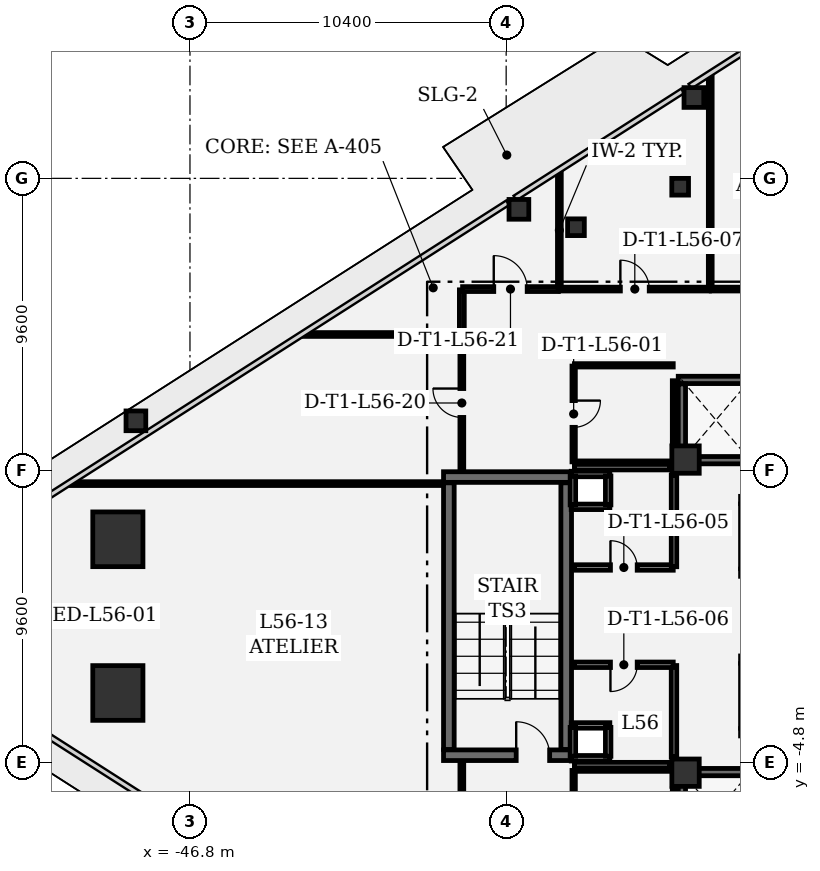
"""IFC4 building model, lengths in metres.
Left out: names, types, materials, properties, quantities, classifications, styles, units other than length and angle.
Written with IfcOpenShell. Run it as: python <this file> out.ifc"""

import sys

from ifc_helpers import new_model, si_unit, direction, frame, frame_2d, origin, origin_2d, place, context, subcontext, project, spatial, rectangle, extrude, element, fill, save


model = new_model("IFC4")
c1 = context("Model", 3, precision=1e-05, world=origin(), true_north=direction((0.0, 1.0)))
c2 = subcontext(c1, "Body", "Model", "MODEL_VIEW")
j1 = project(units=[si_unit("LENGTHUNIT", "METRE"), si_unit("PLANEANGLEUNIT", "RADIAN")], contexts=[c1])
p1 = place(None, origin())
s1 = spatial("IfcSite", under=j1, at=p1, CompositionType="ELEMENT")
p2 = place(p1, origin())
s2 = spatial("IfcBuilding", under=s1, at=p2, CompositionType="ELEMENT")
p3 = place(p2, frame((0.0, 0.0, 241.5)))
s3 = spatial("IfcBuildingStorey", under=s2, at=p3, CompositionType="ELEMENT", Elevation=241.5)
for number, where, z_axis, x_axis in (
    (1, (-49.172, 2.528, 0.0), (0.0, 0.0, 1.0), (1.0, 0.0, 0.0)),
    (2, (-49.172, -2.528, 0.0), (0.0, 0.0, 1.0), (1.0, 0.0, 0.0)),
):
    element("IfcColumn", number, at=place(p3, frame(where, z_axis=z_axis, x_axis=x_axis)), inside=s3, PredefinedType="COLUMN", context=c2, shape_type="SweptSolid", body=[
        extrude(rectangle(XDim=1.65, YDim=1.8, at=origin_2d()), origin(), (0.0, 0.0, 1.0), 4.05),
    ])
for number, where, z_axis, x_axis in (
    (3, (-30.5, 5.15, 0.0), (0.0, 0.0, 1.0), (1.0, 0.0, 0.0)),
    (4, (-30.5, -5.15, 0.0), (0.0, 0.0, 1.0), (1.0, 0.0, 0.0)),
):
    element("IfcColumn", number, at=place(p3, frame(where, z_axis=z_axis, x_axis=x_axis)), inside=s3, PredefinedType="COLUMN", context=c2, shape_type="SweptSolid", body=[
        extrude(rectangle(XDim=0.9, YDim=0.9, at=origin_2d()), origin(), (0.0, 0.0, 1.0), 4.05),
    ])
for number, where, z_axis, x_axis in (
    (5, (-48.578, 6.425, 0.0), (0.0, 0.0, 1.0), (1.0, 0.0, 0.0)),
    (6, (-35.981, 13.381, 0.0), (0.0, 0.0, 1.0), (1.0, 0.0, 0.0)),
    (7, (-30.225, 17.06, 0.0), (0.0, 0.0, 1.0), (1.0, 0.0, 0.0)),
):
    element("IfcColumn", number, at=place(p3, frame(where, z_axis=z_axis, x_axis=x_axis)), inside=s3, PredefinedType="COLUMN", context=c2, shape_type="SweptSolid", body=[
        extrude(rectangle(XDim=0.65, YDim=0.65, at=origin_2d()), origin(), (0.0, 0.0, 1.0), 4.05),
    ])
for number, where, z_axis, x_axis in (
    (8, (-34.104, 12.792, 0.0), (0.0, 0.0, 1.0), (1.0, 0.0, 0.0)),
    (9, (-30.677, 14.124, 0.0), (0.0, 0.0, 1.0), (1.0, 0.0, 0.0)),
):
    element("IfcColumn", number, at=place(p3, frame(where, z_axis=z_axis, x_axis=x_axis)), inside=s3, PredefinedType="COLUMN", context=c2, shape_type="SweptSolid", body=[
        extrude(rectangle(XDim=0.55, YDim=0.55, at=origin_2d()), origin(), (0.0, 0.0, 1.0), 4.05),
    ])
p4 = place(p3, frame((-38.46, -4.575, 0.0), z_axis=(0.0, 0.0, 1.0), x_axis=(1.0, 0.0, 0.0)))
e10 = element("IfcWall", 10, at=p4, inside=s3, PredefinedType="SHEAR", context=c2, shape_type="SweptSolid", body=[
    extrude(rectangle(XDim=4.21, YDim=0.35, at=frame_2d((2.105, 0.0))), origin(), (0.0, 0.0, 1.0), 3.78),
])
p5 = place(p4, frame((2.39, 0.0, 0.0)))
e11 = element("IfcOpeningElement", 11, at=p5, cuts=e10, PredefinedType="OPENING", context=c2, shape_type="SweptSolid", body=[
    extrude(rectangle(XDim=1.1, YDim=2.2, at=frame_2d((0.55, 1.1))), frame((0.0, 0.185, 0.0), z_axis=(0.0, -1.0, 0.0), x_axis=(1.0, 0.0, 0.0)), (0.0, 0.0, 1.0), 0.37),
])
p6 = place(p3, frame((-34.25, 4.575, 0.0), z_axis=(0.0, 0.0, 1.0), x_axis=(-1.0, 0.0, 0.0)))
e12 = element("IfcWall", 12, at=p6, inside=s3, PredefinedType="SHEAR", context=c2, shape_type="SweptSolid", body=[
    extrude(rectangle(XDim=4.21, YDim=0.35, at=frame_2d((2.105, 0.0))), origin(), (0.0, 0.0, 1.0), 3.78),
])
for number, where, z_axis, x_axis in (
    (13, (-34.425, -4.385, 0.0), (0.0, 0.0, 1.0), (0.0, 1.0, 0.0)),
    (14, (-38.285, 4.385, 0.0), (0.0, 0.0, 1.0), (0.0, -1.0, 0.0)),
):
    element("IfcWall", number, at=place(p3, frame(where, z_axis=z_axis, x_axis=x_axis)), inside=s3, PredefinedType="SHEAR", context=c2, shape_type="SweptSolid", body=[
        extrude(rectangle(XDim=8.77, YDim=0.35, at=frame_2d((4.385, 0.0))), origin(), (0.0, 0.0, 1.0), 3.78),
    ])
for number, where, z_axis, x_axis in (
    (15, (-28.26, 5.13, 0.0), (0.0, 0.0, 1.0), (-1.0, 0.0, 0.0)),
    (16, (-30.74, 7.77, 0.0), (0.0, 0.0, 1.0), (1.0, 0.0, 0.0)),
):
    element("IfcWall", number, at=place(p3, frame(where, z_axis=z_axis, x_axis=x_axis)), inside=s3, PredefinedType="SHEAR", context=c2, shape_type="SweptSolid", body=[
        extrude(rectangle(XDim=2.48, YDim=0.24, at=frame_2d((1.24, 0.0))), origin(), (0.0, 0.0, 1.0), 3.78),
    ])
p7 = place(p3, frame((-30.62, 5.262, 0.0), z_axis=(0.0, 0.0, 1.0), x_axis=(0.0, 1.0, 0.0)))
e17 = element("IfcWall", 17, at=p7, inside=s3, PredefinedType="SHEAR", context=c2, shape_type="SweptSolid", body=[
    extrude(rectangle(XDim=2.376, YDim=0.24, at=frame_2d((1.188, 0.0))), origin(), (0.0, 0.0, 1.0), 3.78),
])
p8 = place(p3, frame((-30.74, -5.13, 0.0), z_axis=(0.0, 0.0, 1.0), x_axis=(1.0, 0.0, 0.0)))
e18 = element("IfcWall", 18, at=p8, inside=s3, PredefinedType="SHEAR", context=c2, shape_type="SweptSolid", body=[
    extrude(rectangle(XDim=2.48, YDim=0.24, at=frame_2d((1.24, 0.0))), origin(), (0.0, 0.0, 1.0), 3.78),
])
p9 = place(p3, frame((-30.62, -7.638, 0.0), z_axis=(0.0, 0.0, 1.0), x_axis=(0.0, 1.0, 0.0)))
e19 = element("IfcWall", 19, at=p9, inside=s3, PredefinedType="SHEAR", context=c2, shape_type="SweptSolid", body=[
    extrude(rectangle(XDim=2.376, YDim=0.24, at=frame_2d((1.188, 0.0))), origin(), (0.0, 0.0, 1.0), 3.78),
])
for number, where, z_axis, x_axis in (
    (20, (-26.61, 1.43, 0.0), (0.0, 0.0, 1.0), (-1.0, 0.0, 0.0)),
    (21, (-28.69, 3.82, 0.0), (0.0, 0.0, 1.0), (1.0, 0.0, 0.0)),
):
    element("IfcWall", number, at=place(p3, frame(where, z_axis=z_axis, x_axis=x_axis)), inside=s3, PredefinedType="SHEAR", context=c2, shape_type="SweptSolid", body=[
        extrude(rectangle(XDim=2.08, YDim=0.24, at=frame_2d((1.04, 0.0))), origin(), (0.0, 0.0, 1.0), 3.78),
    ])
p10 = place(p3, frame((-28.57, 1.562, 0.0), z_axis=(0.0, 0.0, 1.0), x_axis=(0.0, 1.0, 0.0)))
e22 = element("IfcWall", 22, at=p10, inside=s3, PredefinedType="SHEAR", context=c2, shape_type="SweptSolid", body=[
    extrude(rectangle(XDim=2.126, YDim=0.24, at=frame_2d((1.063, 0.0))), origin(), (0.0, 0.0, 1.0), 3.78),
])
for number, where, z_axis, x_axis in (
    (23, (-26.61, -3.82, 0.0), (0.0, 0.0, 1.0), (-1.0, 0.0, 0.0)),
    (24, (-28.69, -1.43, 0.0), (0.0, 0.0, 1.0), (1.0, 0.0, 0.0)),
):
    element("IfcWall", number, at=place(p3, frame(where, z_axis=z_axis, x_axis=x_axis)), inside=s3, PredefinedType="SHEAR", context=c2, shape_type="SweptSolid", body=[
        extrude(rectangle(XDim=2.08, YDim=0.24, at=frame_2d((1.04, 0.0))), origin(), (0.0, 0.0, 1.0), 3.78),
    ])
p11 = place(p3, frame((-28.57, -3.688, 0.0), z_axis=(0.0, 0.0, 1.0), x_axis=(0.0, 1.0, 0.0)))
e25 = element("IfcWall", 25, at=p11, inside=s3, PredefinedType="SHEAR", context=c2, shape_type="SweptSolid", body=[
    extrude(rectangle(XDim=2.126, YDim=0.24, at=frame_2d((1.063, 0.0))), origin(), (0.0, 0.0, 1.0), 3.78),
])
for number, where, z_axis, x_axis in (
    (26, (-32.99, 3.595, 0.0), (0.0, 0.0, 1.0), (-1.0, 0.0, 0.0)),
    (27, (-34.26, 4.675, 0.0), (0.0, 0.0, 1.0), (1.0, 0.0, 0.0)),
):
    element("IfcWall", number, at=place(p3, frame(where, z_axis=z_axis, x_axis=x_axis)), inside=s3, PredefinedType="PARTITIONING", context=c2, shape_type="SweptSolid", body=[
        extrude(rectangle(XDim=1.27, YDim=0.18, at=frame_2d((0.635, 0.0))), origin(), (0.0, 0.0, 1.0), 3.78),
    ])
for number, where, z_axis, x_axis in (
    (28, (-34.205, 3.66, 0.0), (0.0, 0.0, 1.0), (0.0, 1.0, 0.0)),
    (29, (-33.045, 4.61, 0.0), (0.0, 0.0, 1.0), (0.0, -1.0, 0.0)),
):
    element("IfcWall", number, at=place(p3, frame(where, z_axis=z_axis, x_axis=x_axis)), inside=s3, PredefinedType="PARTITIONING", context=c2, shape_type="SweptSolid", body=[
        extrude(rectangle(XDim=0.95, YDim=0.18, at=frame_2d((0.475, 0.0))), origin(), (0.0, 0.0, 1.0), 3.78),
    ])
for number, where, z_axis, x_axis in (
    (30, (-32.99, -4.675, 0.0), (0.0, 0.0, 1.0), (-1.0, 0.0, 0.0)),
    (31, (-34.26, -3.595, 0.0), (0.0, 0.0, 1.0), (1.0, 0.0, 0.0)),
):
    element("IfcWall", number, at=place(p3, frame(where, z_axis=z_axis, x_axis=x_axis)), inside=s3, PredefinedType="PARTITIONING", context=c2, shape_type="SweptSolid", body=[
        extrude(rectangle(XDim=1.27, YDim=0.18, at=frame_2d((0.635, 0.0))), origin(), (0.0, 0.0, 1.0), 3.78),
    ])
for number, where, z_axis, x_axis in (
    (32, (-34.205, -4.61, 0.0), (0.0, 0.0, 1.0), (0.0, 1.0, 0.0)),
    (33, (-33.045, -3.66, 0.0), (0.0, 0.0, 1.0), (0.0, -1.0, 0.0)),
):
    element("IfcWall", number, at=place(p3, frame(where, z_axis=z_axis, x_axis=x_axis)), inside=s3, PredefinedType="PARTITIONING", context=c2, shape_type="SweptSolid", body=[
        extrude(rectangle(XDim=0.95, YDim=0.18, at=frame_2d((0.475, 0.0))), origin(), (0.0, 0.0, 1.0), 3.78),
    ])
p12 = place(p3, frame((-34.18, 8.225, 0.0), z_axis=(0.0, 0.0, 1.0), x_axis=(0.0, -1.0, 0.0)))
e34 = element("IfcWall", 34, at=p12, inside=s3, PredefinedType="PARTITIONING", context=c2, shape_type="SweptSolid", body=[
    extrude(rectangle(XDim=3.15, YDim=0.11, at=frame_2d((1.575, 0.0))), origin(), (0.0, 0.0, 1.0), 3.78),
])
p13 = place(p12, frame((1.135, 0.0, 0.0)))
e35 = element("IfcOpeningElement", 35, at=p13, cuts=e34, PredefinedType="OPENING", context=c2, shape_type="SweptSolid", body=[
    extrude(rectangle(XDim=0.88, YDim=2.1, at=frame_2d((0.44, 1.05))), frame((0.0, 0.065, 0.0), z_axis=(0.0, -1.0, 0.0), x_axis=(1.0, 0.0, 0.0)), (0.0, 0.0, 1.0), 0.13),
])
p14 = place(p3, frame((-34.155, 5.05, 0.0), z_axis=(0.0, 0.0, 1.0), x_axis=(1.0, 0.0, 0.0)))
e36 = element("IfcWall", 36, at=p14, inside=s3, PredefinedType="PARTITIONING", context=c2, shape_type="SweptSolid", body=[
    extrude(rectangle(XDim=3.14, YDim=0.11, at=frame_2d((1.57, 0.0))), origin(), (0.0, 0.0, 1.0), 3.78),
])
p15 = place(p3, frame((-30.88, 5.665, 0.0), z_axis=(0.0, 0.0, 1.0), x_axis=(0.0, 1.0, 0.0)))
e37 = element("IfcWall", 37, at=p15, inside=s3, PredefinedType="PARTITIONING", context=c2, shape_type="SweptSolid", body=[
    extrude(rectangle(XDim=2.078, YDim=0.11, at=frame_2d((1.039, 0.0))), origin(), (0.0, 0.0, 1.0), 3.78),
])
p16 = place(p3, frame((-30.905, 8.25, 0.0), z_axis=(0.0, 0.0, 1.0), x_axis=(-1.0, 0.0, 0.0)))
e38 = element("IfcWall", 38, at=p16, inside=s3, PredefinedType="PARTITIONING", context=c2, shape_type="SweptSolid", body=[
    extrude(rectangle(XDim=3.25, YDim=0.11, at=frame_2d((1.625, 0.0))), origin(), (0.0, 0.0, 1.0), 3.78),
])
p17 = place(p3, frame((-30.88, -7.743, 0.0), z_axis=(0.0, 0.0, 1.0), x_axis=(0.0, 1.0, 0.0)))
e39 = element("IfcWall", 39, at=p17, inside=s3, PredefinedType="PARTITIONING", context=c2, shape_type="SweptSolid", body=[
    extrude(rectangle(XDim=2.078, YDim=0.11, at=frame_2d((1.039, 0.0))), origin(), (0.0, 0.0, 1.0), 3.78),
])
p18 = place(p3, frame((-31.015, -5.05, 0.0), z_axis=(0.0, 0.0, 1.0), x_axis=(-1.0, 0.0, 0.0)))
e40 = element("IfcWall", 40, at=p18, inside=s3, PredefinedType="PARTITIONING", context=c2, shape_type="SweptSolid", body=[
    extrude(rectangle(XDim=3.14, YDim=0.11, at=frame_2d((1.57, 0.0))), origin(), (0.0, 0.0, 1.0), 3.78),
])
p19 = place(p3, frame((-34.18, -5.075, 0.0), z_axis=(0.0, 0.0, 1.0), x_axis=(0.0, -1.0, 0.0)))
e41 = element("IfcWall", 41, at=p19, inside=s3, PredefinedType="PARTITIONING", context=c2, shape_type="SweptSolid", body=[
    extrude(rectangle(XDim=3.25, YDim=0.11, at=frame_2d((1.625, 0.0))), origin(), (0.0, 0.0, 1.0), 3.78),
])
p20 = place(p19, frame((1.185, 0.0, 0.0)))
e42 = element("IfcOpeningElement", 42, at=p20, cuts=e41, PredefinedType="OPENING", context=c2, shape_type="SweptSolid", body=[
    extrude(rectangle(XDim=0.88, YDim=2.1, at=frame_2d((0.44, 1.05))), frame((0.0, 0.065, 0.0), z_axis=(0.0, -1.0, 0.0), x_axis=(1.0, 0.0, 0.0)), (0.0, 0.0, 1.0), 0.13),
])
p21 = place(p3, frame((-34.155, 1.6, 0.0), z_axis=(0.0, 0.0, 1.0), x_axis=(1.0, 0.0, 0.0)))
e43 = element("IfcWall", 43, at=p21, inside=s3, PredefinedType="PARTITIONING", context=c2, shape_type="SweptSolid", body=[
    extrude(rectangle(XDim=3.25, YDim=0.18, at=frame_2d((1.625, 0.0))), origin(), (0.0, 0.0, 1.0), 3.78),
])
p22 = place(p21, frame((1.185, 0.0, 0.0)))
e44 = element("IfcOpeningElement", 44, at=p22, cuts=e43, PredefinedType="OPENING", context=c2, shape_type="SweptSolid", body=[
    extrude(rectangle(XDim=0.88, YDim=2.1, at=frame_2d((0.44, 1.05))), frame((0.0, 0.1, 0.0), z_axis=(0.0, -1.0, 0.0), x_axis=(1.0, 0.0, 0.0)), (0.0, 0.0, 1.0), 0.2),
])
p23 = place(p3, frame((-30.88, 1.625, 0.0), z_axis=(0.0, 0.0, 1.0), x_axis=(0.0, 1.0, 0.0)))
e45 = element("IfcWall", 45, at=p23, inside=s3, PredefinedType="PARTITIONING", context=c2, shape_type="SweptSolid", body=[
    extrude(rectangle(XDim=3.01, YDim=0.18, at=frame_2d((1.505, 0.0))), origin(), (0.0, 0.0, 1.0), 3.78),
])
for number, where, z_axis, x_axis in (
    (46, (-31.015, 4.9, 0.0), (0.0, 0.0, 1.0), (-1.0, 0.0, 0.0)),
    (47, (-34.155, -4.9, 0.0), (0.0, 0.0, 1.0), (1.0, 0.0, 0.0)),
):
    element("IfcWall", number, at=place(p3, frame(where, z_axis=z_axis, x_axis=x_axis)), inside=s3, PredefinedType="PARTITIONING", context=c2, shape_type="SweptSolid", body=[
        extrude(rectangle(XDim=3.14, YDim=0.18, at=frame_2d((1.57, 0.0))), origin(), (0.0, 0.0, 1.0), 3.78),
    ])
p24 = place(p3, frame((-30.88, -4.635, 0.0), z_axis=(0.0, 0.0, 1.0), x_axis=(0.0, 1.0, 0.0)))
e48 = element("IfcWall", 48, at=p24, inside=s3, PredefinedType="PARTITIONING", context=c2, shape_type="SweptSolid", body=[
    extrude(rectangle(XDim=3.01, YDim=0.18, at=frame_2d((1.505, 0.0))), origin(), (0.0, 0.0, 1.0), 3.78),
])
p25 = place(p3, frame((-30.905, -1.6, 0.0), z_axis=(0.0, 0.0, 1.0), x_axis=(-1.0, 0.0, 0.0)))
e49 = element("IfcWall", 49, at=p25, inside=s3, PredefinedType="PARTITIONING", context=c2, shape_type="SweptSolid", body=[
    extrude(rectangle(XDim=3.25, YDim=0.18, at=frame_2d((1.625, 0.0))), origin(), (0.0, 0.0, 1.0), 3.78),
])
p26 = place(p25, frame((1.185, 0.0, 0.0)))
e50 = element("IfcOpeningElement", 50, at=p26, cuts=e49, PredefinedType="OPENING", context=c2, shape_type="SweptSolid", body=[
    extrude(rectangle(XDim=0.88, YDim=2.1, at=frame_2d((0.44, 1.05))), frame((0.0, 0.1, 0.0), z_axis=(0.0, -1.0, 0.0), x_axis=(1.0, 0.0, 0.0)), (0.0, 0.0, 1.0), 0.2),
])
p27 = place(p3, frame((-34.65, 14.604, 0.0), z_axis=(0.0, 0.0, 1.0), x_axis=(0.0, -1.0, 0.0)))
e51 = element("IfcWall", 51, at=p27, inside=s3, PredefinedType="PARTITIONING", context=c2, shape_type="SweptSolid", body=[
    extrude(rectangle(XDim=3.82, YDim=0.125, at=frame_2d((1.91, 0.0))), origin(), (0.0, 0.0, 1.0), 3.78),
])
p28 = place(p3, frame((-34.625, 10.758, 0.0), z_axis=(0.0, 0.0, 1.0), x_axis=(1.0, 0.0, 0.0)))
e52 = element("IfcWall", 52, at=p28, inside=s3, PredefinedType="PARTITIONING", context=c2, shape_type="SweptSolid", body=[
    extrude(rectangle(XDim=4.913, YDim=0.125, at=frame_2d((2.456, 0.0))), origin(), (0.0, 0.0, 1.0), 3.0),
])
p29 = place(p28, frame((1.981, 0.0, 0.0)))
e53 = element("IfcOpeningElement", 53, at=p29, cuts=e52, PredefinedType="OPENING", context=c2, shape_type="SweptSolid", body=[
    extrude(rectangle(XDim=0.95, YDim=2.15, at=frame_2d((0.475, 1.075))), frame((0.0, 0.073, 0.0), z_axis=(0.0, -1.0, 0.0), x_axis=(1.0, 0.0, 0.0)), (0.0, 0.0, 1.0), 0.145),
])
p30 = place(p3, frame((-29.687, 10.783, 0.0), z_axis=(0.0, 0.0, 1.0), x_axis=(0.0, 1.0, 0.0)))
e54 = element("IfcWall", 54, at=p30, inside=s3, PredefinedType="PARTITIONING", context=c2, shape_type="SweptSolid", body=[
    extrude(rectangle(XDim=6.992, YDim=0.125, at=frame_2d((3.496, 0.0))), origin(), (0.0, 0.0, 1.0), 3.78),
])
p31 = place(p3, frame((-29.654, 10.758, 0.0), z_axis=(0.0, 0.0, 1.0), x_axis=(1.0, 0.0, 0.0)))
e55 = element("IfcWall", 55, at=p31, inside=s3, PredefinedType="PARTITIONING", context=c2, shape_type="SweptSolid", body=[
    extrude(rectangle(XDim=4.562, YDim=0.125, at=frame_2d((2.281, 0.0))), origin(), (0.0, 0.0, 1.0), 3.78),
])
p32 = place(p31, frame((1.806, 0.0, 0.0)))
e56 = element("IfcOpeningElement", 56, at=p32, cuts=e55, PredefinedType="OPENING", context=c2, shape_type="SweptSolid", body=[
    extrude(rectangle(XDim=0.95, YDim=2.15, at=frame_2d((0.475, 1.075))), frame((0.0, 0.073, 0.0), z_axis=(0.0, -1.0, 0.0), x_axis=(1.0, 0.0, 0.0)), (0.0, 0.0, 1.0), 0.145),
])
p33 = place(p3, frame((-37.858, -8.158, 0.0), z_axis=(0.0, 0.0, 1.0), x_axis=(0.0, 1.0, 0.0)))
e57 = element("IfcWall", 57, at=p33, inside=s3, PredefinedType="PARTITIONING", context=c2, shape_type="SweptSolid", body=[
    extrude(rectangle(XDim=3.375, YDim=0.125, at=frame_2d((1.687, 0.0))), origin(), (0.0, 0.0, 1.0), 3.78),
])
p34 = place(p33, frame((1.212, 0.0, 0.0)))
e58 = element("IfcOpeningElement", 58, at=p34, cuts=e57, PredefinedType="OPENING", context=c2, shape_type="SweptSolid", body=[
    extrude(rectangle(XDim=0.95, YDim=2.15, at=frame_2d((0.475, 1.075))), frame((0.0, 0.073, 0.0), z_axis=(0.0, -1.0, 0.0), x_axis=(1.0, 0.0, 0.0)), (0.0, 0.0, 1.0), 0.145),
])
p35 = place(p3, frame((-38.493, 4.36, 0.0), z_axis=(0.0, 0.0, 1.0), x_axis=(-0.99999999024, -0.000139712192, 0.0)))
e59 = element("IfcWall", 59, at=p35, inside=s3, PredefinedType="PARTITIONING", context=c2, shape_type="SweptSolid", body=[
    extrude(rectangle(XDim=12.232, YDim=0.125, at=frame_2d((6.116, 0.0))), origin(), (0.0, 0.0, 1.0), 3.0),
])
p36 = place(p3, frame((-37.858, 4.783, 0.0), z_axis=(0.0, 0.0, 1.0), x_axis=(0.0, 1.0, 0.0)))
e60 = element("IfcWall", 60, at=p36, inside=s3, PredefinedType="PARTITIONING", context=c2, shape_type="SweptSolid", body=[
    extrude(rectangle(XDim=4.456, YDim=0.125, at=frame_2d((2.228, 0.0))), origin(), (0.0, 0.0, 1.0), 3.78),
])
p37 = place(p36, frame((1.753, 0.0, 0.0)))
e61 = element("IfcOpeningElement", 61, at=p37, cuts=e60, PredefinedType="OPENING", context=c2, shape_type="SweptSolid", body=[
    extrude(rectangle(XDim=0.95, YDim=2.15, at=frame_2d((0.475, 1.075))), frame((0.0, 0.073, 0.0), z_axis=(0.0, -1.0, 0.0), x_axis=(1.0, 0.0, 0.0)), (0.0, 0.0, 1.0), 0.145),
])
p38 = place(p3, frame((-37.883, 9.264, 0.0), z_axis=(0.0, 0.0, 1.0), x_axis=(-1.0, 0.0, 0.0)))
e62 = element("IfcWall", 62, at=p38, inside=s3, PredefinedType="PARTITIONING", context=c2, shape_type="SweptSolid", body=[
    extrude(rectangle(XDim=5.167, YDim=0.125, at=frame_2d((2.583, 0.0))), origin(), (0.0, 0.0, 1.0), 3.0),
])
p39 = place(p3, frame((-37.858, 10.733, 0.0), z_axis=(0.0, 0.0, 1.0), x_axis=(0.0, -1.0, 0.0)))
e63 = element("IfcWall", 63, at=p39, inside=s3, PredefinedType="PARTITIONING", context=c2, shape_type="SweptSolid", body=[
    extrude(rectangle(XDim=1.436, YDim=0.16, at=frame_2d((0.718, 0.0))), origin(), (0.0, 0.0, 1.0), 3.78),
])
p40 = place(p3, frame((-37.833, 10.758, 0.0), z_axis=(0.0, 0.0, 1.0), x_axis=(1.0, 0.0, 0.0)))
e64 = element("IfcWall", 64, at=p40, inside=s3, PredefinedType="PARTITIONING", context=c2, shape_type="SweptSolid", body=[
    extrude(rectangle(XDim=3.15, YDim=0.16, at=frame_2d((1.575, 0.0))), origin(), (0.0, 0.0, 1.0), 3.0),
])
p41 = place(p40, frame((1.025, 0.0, 0.0)))
e65 = element("IfcOpeningElement", 65, at=p41, cuts=e64, PredefinedType="OPENING", context=c2, shape_type="SweptSolid", body=[
    extrude(rectangle(XDim=1.1, YDim=2.15, at=frame_2d((0.55, 1.075))), frame((0.0, 0.09, 0.0), z_axis=(0.0, -1.0, 0.0), x_axis=(1.0, 0.0, 0.0)), (0.0, 0.0, 1.0), 0.18),
])
p42 = place(p5, origin())
e66 = element("IfcDoor", 66, at=p42, inside=s3, OperationType="SINGLE_SWING_LEFT", PredefinedType="DOOR", context=c2, shape_type="SweptSolid", body=[
    extrude(rectangle(XDim=1.1, YDim=2.2, at=frame_2d((0.55, 1.1))), frame((0.0, 0.025, 0.0), z_axis=(0.0, -1.0, 0.0), x_axis=(1.0, 0.0, 0.0)), (0.0, 0.0, 1.0), 0.05),
])
fill(e11, e66)
p43 = place(p13, origin())
e67 = element("IfcDoor", 67, at=p43, inside=s3, OperationType="SINGLE_SWING_LEFT", PredefinedType="DOOR", context=c2, shape_type="SweptSolid", body=[
    extrude(rectangle(XDim=0.88, YDim=2.1, at=frame_2d((0.44, 1.05))), frame((0.0, 0.025, 0.0), z_axis=(0.0, -1.0, 0.0), x_axis=(1.0, 0.0, 0.0)), (0.0, 0.0, 1.0), 0.05),
])
fill(e35, e67)
p44 = place(p22, origin())
e68 = element("IfcDoor", 68, at=p44, inside=s3, OperationType="SINGLE_SWING_LEFT", PredefinedType="DOOR", context=c2, shape_type="SweptSolid", body=[
    extrude(rectangle(XDim=0.88, YDim=2.1, at=frame_2d((0.44, 1.05))), frame((0.0, 0.025, 0.0), z_axis=(0.0, -1.0, 0.0), x_axis=(1.0, 0.0, 0.0)), (0.0, 0.0, 1.0), 0.05),
])
fill(e44, e68)
p45 = place(p26, origin())
e69 = element("IfcDoor", 69, at=p45, inside=s3, OperationType="SINGLE_SWING_RIGHT", PredefinedType="DOOR", context=c2, shape_type="SweptSolid", body=[
    extrude(rectangle(XDim=0.88, YDim=2.1, at=frame_2d((0.44, 1.05))), frame((0.0, 0.025, 0.0), z_axis=(0.0, -1.0, 0.0), x_axis=(1.0, 0.0, 0.0)), (0.0, 0.0, 1.0), 0.05),
])
fill(e50, e69)
p46 = place(p29, origin())
e70 = element("IfcDoor", 70, at=p46, inside=s3, OperationType="SINGLE_SWING_LEFT", PredefinedType="DOOR", context=c2, shape_type="SweptSolid", body=[
    extrude(rectangle(XDim=0.95, YDim=2.15, at=frame_2d((0.475, 1.075))), frame((0.0, 0.025, 0.0), z_axis=(0.0, -1.0, 0.0), x_axis=(1.0, 0.0, 0.0)), (0.0, 0.0, 1.0), 0.05),
])
fill(e53, e70)
p47 = place(p37, origin())
e71 = element("IfcDoor", 71, at=p47, inside=s3, OperationType="SINGLE_SWING_RIGHT", PredefinedType="DOOR", context=c2, shape_type="SweptSolid", body=[
    extrude(rectangle(XDim=0.95, YDim=2.15, at=frame_2d((0.475, 1.075))), frame((0.0, 0.025, 0.0), z_axis=(0.0, -1.0, 0.0), x_axis=(1.0, 0.0, 0.0)), (0.0, 0.0, 1.0), 0.05),
])
fill(e61, e71)
p48 = place(p41, origin())
e72 = element("IfcDoor", 72, at=p48, inside=s3, OperationType="SINGLE_SWING_LEFT", PredefinedType="DOOR", context=c2, shape_type="SweptSolid", body=[
    extrude(rectangle(XDim=1.1, YDim=2.15, at=frame_2d((0.55, 1.075))), frame((0.0, 0.025, 0.0), z_axis=(0.0, -1.0, 0.0), x_axis=(1.0, 0.0, 0.0)), (0.0, 0.0, 1.0), 0.05),
])
fill(e65, e72)
save(model, sys.argv[1])
